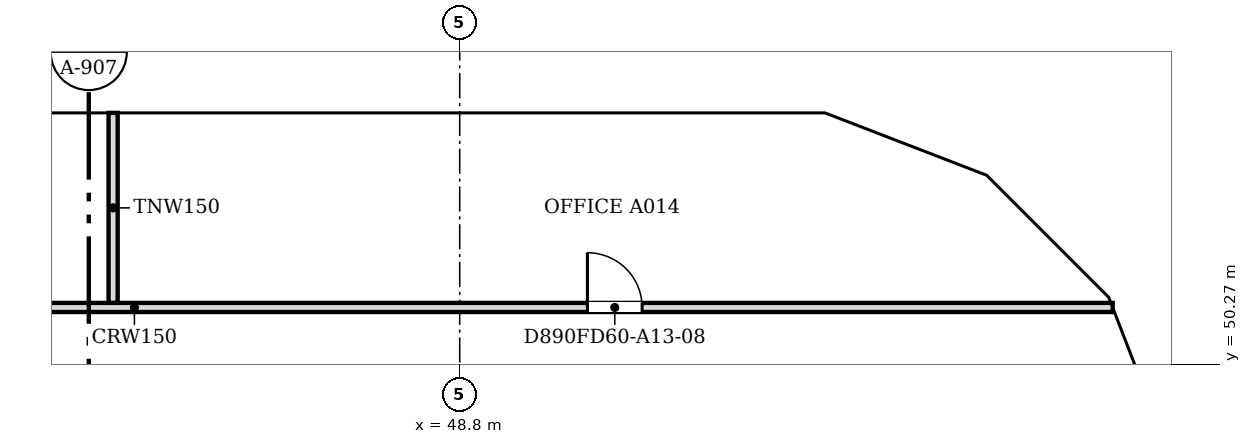
"""IFC4 building model, lengths in metres.
Left out: names, types, materials, properties, quantities, classifications, styles, units other than length and angle.
Written with IfcOpenShell. Run it as: python <this file> out.ifc"""

import sys

from ifc_helpers import new_model, si_unit, direction, frame, frame_2d, origin, place, context, subcontext, project, spatial, polyline, rectangle, outline, extrude, faceted_brep, source, transform, mapped, element, fill, save


model = new_model("IFC4")
c1 = context("Model", 3, precision=1e-05, world=origin(), true_north=direction((0.0, 1.0)))
c2 = subcontext(c1, "Body", "Model", "MODEL_VIEW")
j1 = project(units=[si_unit("LENGTHUNIT", "METRE"), si_unit("PLANEANGLEUNIT", "RADIAN")], contexts=[c1])
p1 = place(None, origin())
s1 = spatial("IfcSite", under=j1, at=p1, CompositionType="ELEMENT")
p2 = place(p1, origin())
s2 = spatial("IfcBuilding", under=s1, at=p2, CompositionType="ELEMENT")
p3 = place(p2, frame((0.0, 0.0, 146.8)))
s3 = spatial("IfcBuildingStorey", under=s2, at=p3, CompositionType="ELEMENT", Elevation=146.8)
m1 = source(origin(), c2, "Body", "Brep", [
    faceted_brep([(0.047, -0.25, 0.0), (2.997, -0.25, 3.8), (0.047, -0.25, 7.6), (0.0, -0.25, 7.541), (0.0, -0.25, 0.059), (0.093, 0.25, 7.54), (2.944, 0.25, 3.868), (2.944, 0.25, 3.732), (0.093, 0.25, 0.06), (2.997, 0.0, 3.8), (0.047, 0.0, 0.0), (0.047, 0.0, 7.6)], [[[0, 1, 2, 3, 4]], [[5, 6, 7, 8]], [[8, 7, 9, 1, 0, 10]], [[6, 5, 11, 2, 1, 9]], [[3, 2, 11]], [[10, 0, 4]], [[8, 10, 4, 3, 11, 5]], [[9, 7, 6]]]),
])
p4 = place(p3, frame((60.767, 48.71, -3.8), z_axis=(0.0, 0.0, 1.0), x_axis=(-0.359901446078, 0.932990326376, 0.0)))
e1 = element("IfcWall", 1, at=p4, inside=s3, PredefinedType="SOLIDWALL", context=c2, shape_type="MappedRepresentation", body=[
    mapped(m1, transform((0.0, 0.0, 0.0), scale=1.0)),
])
m2 = source(origin(), c2, "Body", "SweptSolid", [
    extrude(outline(polyline([(0.247, 0.665), (2.681, 3.8), (0.247, 6.935), (0.247, 0.665)])), frame((0.0, 0.26, 0.0), z_axis=(0.0, -1.0, 0.0), x_axis=(1.0, 0.0, 0.0)), (0.0, 0.0, 1.0), 0.52),
])
p5 = place(p4, origin())
e2 = element("IfcOpeningElement", 2, at=p5, cuts=e1, PredefinedType="OPENING", context=c2, shape_type="MappedRepresentation", body=[
    mapped(m2, transform((0.0, 0.0, 0.0), scale=1.0)),
])
m3 = source(origin(), c2, "Body", "Brep", [
    faceted_brep([(2.944, -0.25, 0.0), (2.997, -0.25, 0.068), (2.997, -0.25, 7.532), (2.944, -0.25, 7.6), (0.0, -0.25, 3.8), (0.053, 0.25, 3.868), (2.891, 0.25, 7.532), (2.891, 0.25, 0.068), (0.053, 0.25, 3.732), (2.944, 0.0, 0.0), (2.944, 0.0, 7.6), (0.0, 0.0, 3.8)], [[[0, 1, 2, 3, 4]], [[5, 6, 7, 8]], [[1, 0, 9]], [[10, 3, 2]], [[6, 5, 11, 4, 3, 10]], [[8, 7, 9, 0, 4, 11]], [[8, 11, 5]], [[1, 9, 7, 6, 10, 2]]]),
])
p6 = place(p3, frame((59.688, 51.506, -3.8), z_axis=(0.0, 0.0, 1.0), x_axis=(-0.707106781187, 0.707106781187, 0.0)))
e3 = element("IfcWall", 3, at=p6, inside=s3, PredefinedType="SOLIDWALL", context=c2, shape_type="MappedRepresentation", body=[
    mapped(m3, transform((0.0, 0.0, 0.0), scale=1.0)),
])
m4 = source(origin(), c2, "Body", "SweptSolid", [
    extrude(outline(polyline([(2.744, 6.934), (0.316, 3.8), (2.744, 0.666), (2.744, 6.934)])), frame((0.0, 0.26, 0.0), z_axis=(0.0, -1.0, 0.0), x_axis=(1.0, 0.0, 0.0)), (0.0, 0.0, 1.0), 0.52),
])
p7 = place(p6, origin())
e4 = element("IfcOpeningElement", 4, at=p7, cuts=e3, PredefinedType="OPENING", context=c2, shape_type="MappedRepresentation", body=[
    mapped(m4, transform((0.0, 0.0, 0.0), scale=1.0)),
])
m5 = source(origin(), c2, "Body", "Brep", [
    faceted_brep([(0.053, -0.25, 0.0), (3.003, -0.25, 3.8), (0.053, -0.25, 7.6), (0.0, -0.25, 7.532), (0.0, -0.25, 0.068), (0.106, 0.25, 7.532), (2.957, 0.25, 3.86), (2.957, 0.25, 3.74), (0.106, 0.25, 0.068), (3.003, 0.0, 3.8), (0.053, 0.0, 0.0), (0.053, 0.0, 7.6)], [[[0, 1, 2, 3, 4]], [[5, 6, 7, 8]], [[8, 7, 9, 1, 0, 10]], [[6, 5, 11, 2, 1, 9]], [[3, 2, 11]], [[10, 0, 4]], [[8, 10, 4, 3, 11, 5]], [[9, 7, 6]]]),
])
p8 = place(p3, frame((57.656, 53.569, -3.8), z_axis=(0.0, 0.0, 1.0), x_axis=(-0.933007896601, 0.359855894603, 0.0)))
e5 = element("IfcWall", 5, at=p8, inside=s3, PredefinedType="SOLIDWALL", context=c2, shape_type="MappedRepresentation", body=[
    mapped(m5, transform((0.0, 0.0, 0.0), scale=1.0)),
])
m6 = source(origin(), c2, "Body", "SweptSolid", [
    extrude(outline(polyline([(0.253, 0.665), (2.687, 3.8), (0.253, 6.935), (0.253, 0.665)])), frame((0.0, 0.26, 0.0), z_axis=(0.0, -1.0, 0.0), x_axis=(1.0, 0.0, 0.0)), (0.0, 0.0, 1.0), 0.52),
])
p9 = place(p8, origin())
e6 = element("IfcOpeningElement", 6, at=p9, cuts=e5, PredefinedType="OPENING", context=c2, shape_type="MappedRepresentation", body=[
    mapped(m6, transform((0.0, 0.0, 0.0), scale=1.0)),
])
m7 = source(origin(), c2, "Body", "Brep", [
    faceted_brep([(3.003, -0.25, 0.0), (6.053, -0.25, 3.8), (3.003, -0.25, 7.6), (0.0, -0.25, 3.8), (0.047, 0.25, 3.859), (3.003, 0.25, 7.6), (6.053, 0.25, 3.8), (3.003, 0.25, 0.0), (0.047, 0.25, 3.741), (0.0, 0.0, 3.8)], [[[0, 1, 2, 3]], [[4, 5, 6, 7, 8]], [[7, 6, 1, 0]], [[6, 5, 2, 1]], [[5, 4, 9, 3, 2]], [[8, 7, 0, 3, 9]], [[8, 9, 4]]]),
])
p10 = place(p3, frame((54.854, 54.65, -3.8), z_axis=(0.0, 0.0, 1.0), x_axis=(-1.0, 0.0, 0.0)))
e7 = element("IfcWall", 7, at=p10, inside=s3, PredefinedType="SOLIDWALL", context=c2, shape_type="MappedRepresentation", body=[
    mapped(m7, transform((0.0, 0.0, 0.0), scale=1.0)),
])
m8 = source(origin(), c2, "Body", "SweptSolid", [
    extrude(outline(polyline([(3.005, 0.401), (5.733, 3.8), (3.005, 7.199), (0.319, 3.8), (3.005, 0.401)])), frame((0.0, 0.26, 0.0), z_axis=(0.0, -1.0, 0.0), x_axis=(1.0, 0.0, 0.0)), (0.0, 0.0, 1.0), 0.52),
])
p11 = place(p10, origin())
e8 = element("IfcOpeningElement", 8, at=p11, cuts=e7, PredefinedType="OPENING", context=c2, shape_type="MappedRepresentation", body=[
    mapped(m8, transform((0.0, 0.0, 0.0), scale=1.0)),
])
m9 = source(origin(), c2, "Body", "SweptSolid", [
    extrude(outline(polyline([(3.05, 0.0), (6.1, 3.8), (3.05, 7.6), (0.0, 3.8), (3.05, 0.0)])), frame((0.0, 0.25, 0.0), z_axis=(0.0, -1.0, 0.0), x_axis=(1.0, 0.0, 0.0)), (0.0, 0.0, 1.0), 0.5),
])
p12 = place(p3, frame((48.8, 54.65, -3.8), z_axis=(0.0, 0.0, 1.0), x_axis=(-1.0, 0.0, 0.0)))
e9 = element("IfcWall", 9, at=p12, inside=s3, PredefinedType="SOLIDWALL", context=c2, shape_type="MappedRepresentation", body=[
    mapped(m9, transform((0.0, 0.0, 0.0), scale=1.0)),
])
m10 = source(origin(), c2, "Body", "SweptSolid", [
    extrude(outline(polyline([(3.05, 0.399), (5.78, 3.8), (3.05, 7.201), (0.321, 3.8), (3.05, 0.399)])), frame((0.0, 0.26, 0.0), z_axis=(0.0, -1.0, 0.0), x_axis=(1.0, 0.0, 0.0)), (0.0, 0.0, 1.0), 0.52),
])
p13 = place(p12, origin())
e10 = element("IfcOpeningElement", 10, at=p13, cuts=e9, PredefinedType="OPENING", context=c2, shape_type="MappedRepresentation", body=[
    mapped(m10, transform((0.0, 0.0, 0.0), scale=1.0)),
])
m11 = source(origin(), c2, "Body", "Brep", [
    faceted_brep([(3.05, -0.25, 0.0), (6.1, -0.25, 3.8), (6.1, -0.25, 3.8), (3.05, -0.25, 7.6), (0.0, -0.25, 3.8), (0.0, 0.25, 3.8), (3.05, 0.25, 7.6), (6.1, 0.25, 3.8), (6.1, 0.25, 3.8), (3.05, 0.25, 0.0)], [[[0, 1, 2, 3, 4]], [[5, 6, 7, 8, 9]], [[9, 8, 1, 0]], [[7, 6, 3, 2]], [[6, 5, 4, 3]], [[5, 9, 0, 4]], [[1, 8, 7, 2]]]),
])
p14 = place(p3, frame((42.7, 54.65, -3.8), z_axis=(0.0, 0.0, 1.0), x_axis=(-1.0, 0.0, 0.0)))
e11 = element("IfcWall", 11, at=p14, inside=s3, PredefinedType="SOLIDWALL", context=c2, shape_type="MappedRepresentation", body=[
    mapped(m11, transform((0.0, 0.0, 0.0), scale=1.0)),
])
p15 = place(p14, origin())
e12 = element("IfcOpeningElement", 12, at=p15, cuts=e11, PredefinedType="OPENING", context=c2, shape_type="MappedRepresentation", body=[
    mapped(m10, transform((0.0, 0.0, 0.0), scale=1.0)),
])
m12 = source(origin(), c2, "Body", "Brep", [
    faceted_brep([(2.95, -0.25, 0.0), (3.003, -0.25, 0.068), (3.003, -0.25, 3.8), (0.0, -0.25, 3.8), (0.047, 0.25, 3.8), (2.898, 0.25, 3.8), (2.898, 0.25, 0.068), (0.047, 0.25, 3.74), (2.95, 0.0, 0.0), (0.0, 0.0, 3.8)], [[[0, 1, 2, 3]], [[4, 5, 6, 7]], [[1, 0, 8]], [[5, 4, 9, 3, 2]], [[7, 6, 8, 0, 3, 9]], [[7, 9, 4]], [[1, 8, 6, 5, 2]]]),
])
p16 = place(p3, frame((60.75, 48.753, 0.0), z_axis=(0.0, 0.0, 1.0), x_axis=(-0.35992665181, 0.932980602862, 0.0)))
e13 = element("IfcWall", 13, at=p16, inside=s3, PredefinedType="SOLIDWALL", context=c2, shape_type="MappedRepresentation", body=[
    mapped(m12, transform((0.0, 0.0, 0.0), scale=1.0)),
])
m13 = source(origin(), c2, "Body", "SweptSolid", [
    extrude(outline(polyline([(2.75, 3.55), (0.511, 3.55), (2.75, 0.665), (2.75, 3.55)])), frame((0.0, 0.26, 0.0), z_axis=(0.0, -1.0, 0.0), x_axis=(1.0, 0.0, 0.0)), (0.0, 0.0, 1.0), 0.52),
])
p17 = place(p16, origin())
e14 = element("IfcOpeningElement", 14, at=p17, cuts=e13, PredefinedType="OPENING", context=c2, shape_type="MappedRepresentation", body=[
    mapped(m13, transform((0.0, 0.0, 0.0), scale=1.0)),
])
m14 = source(origin(), c2, "Body", "Brep", [
    faceted_brep([(0.053, -0.25, 0.0), (2.997, -0.25, 3.8), (0.0, -0.25, 3.8), (0.0, -0.25, 0.068), (0.106, 0.25, 3.8), (2.944, 0.25, 3.8), (2.944, 0.25, 3.732), (0.106, 0.25, 0.068), (2.997, 0.0, 3.8), (0.053, 0.0, 0.0)], [[[0, 1, 2, 3]], [[4, 5, 6, 7]], [[7, 6, 8, 1, 0, 9]], [[5, 4, 2, 1, 8]], [[9, 0, 3]], [[7, 9, 3, 2, 4]], [[6, 5, 8]]]),
])
p18 = place(p3, frame((59.726, 51.469, 0.0), z_axis=(0.0, 0.0, 1.0), x_axis=(-0.707106781187, 0.707106781187, 0.0)))
e15 = element("IfcWall", 15, at=p18, inside=s3, PredefinedType="SOLIDWALL", context=c2, shape_type="MappedRepresentation", body=[
    mapped(m14, transform((0.0, 0.0, 0.0), scale=1.0)),
])
m15 = source(origin(), c2, "Body", "SweptSolid", [
    extrude(outline(polyline([(0.253, 0.666), (2.487, 3.55), (0.253, 3.55), (0.253, 0.666)])), frame((0.0, 0.26, 0.0), z_axis=(0.0, -1.0, 0.0), x_axis=(1.0, 0.0, 0.0)), (0.0, 0.0, 1.0), 0.52),
])
p19 = place(p18, origin())
e16 = element("IfcOpeningElement", 16, at=p19, cuts=e15, PredefinedType="OPENING", context=c2, shape_type="MappedRepresentation", body=[
    mapped(m15, transform((0.0, 0.0, 0.0), scale=1.0)),
])
m16 = source(origin(), c2, "Body", "Brep", [
    faceted_brep([(2.95, -0.25, 0.0), (2.997, -0.25, 0.059), (2.997, -0.25, 3.8), (0.0, -0.25, 3.8), (0.053, 0.25, 3.8), (2.904, 0.25, 3.8), (2.904, 0.25, 0.06), (0.053, 0.25, 3.732), (2.95, 0.0, 0.0), (0.0, 0.0, 3.8)], [[[0, 1, 2, 3]], [[4, 5, 6, 7]], [[1, 0, 8]], [[5, 4, 9, 3, 2]], [[7, 6, 8, 0, 3, 9]], [[7, 9, 4]], [[1, 8, 6, 5, 2]]]),
])
p20 = place(p3, frame((57.606, 53.588, 0.0), z_axis=(0.0, 0.0, 1.0), x_axis=(-0.932990326376, 0.359901446078, 0.0)))
e17 = element("IfcWall", 17, at=p20, inside=s3, PredefinedType="SOLIDWALL", context=c2, shape_type="MappedRepresentation", body=[
    mapped(m16, transform((0.0, 0.0, 0.0), scale=1.0)),
])
p21 = place(p20, origin())
e18 = element("IfcOpeningElement", 18, at=p21, cuts=e17, PredefinedType="OPENING", context=c2, shape_type="MappedRepresentation", body=[
    mapped(m13, transform((0.0, 0.0, 0.0), scale=1.0)),
])
m17 = source(origin(), c2, "Body", "Brep", [
    faceted_brep([(0.047, -0.25, 0.0), (3.05, -0.25, 3.8), (0.0, -0.25, 3.8), (0.0, -0.25, 0.06), (0.093, 0.25, 3.8), (3.05, 0.25, 3.8), (0.093, 0.25, 0.059), (0.047, 0.0, 0.0)], [[[0, 1, 2, 3]], [[4, 5, 6]], [[6, 5, 1, 0, 7]], [[5, 4, 2, 1]], [[7, 0, 3]], [[6, 7, 3, 2, 4]]]),
])
p22 = place(p3, frame((54.9, 54.65, 0.0), z_axis=(0.0, 0.0, 1.0), x_axis=(-1.0, 0.0, 0.0)))
e19 = element("IfcWall", 19, at=p22, inside=s3, PredefinedType="SOLIDWALL", context=c2, shape_type="MappedRepresentation", body=[
    mapped(m17, transform((0.0, 0.0, 0.0), scale=1.0)),
])
m18 = source(origin(), c2, "Body", "SweptSolid", [
    extrude(outline(polyline([(0.247, 0.656), (2.534, 3.55), (0.247, 3.55), (0.247, 0.656)])), frame((0.0, 0.26, 0.0), z_axis=(0.0, -1.0, 0.0), x_axis=(1.0, 0.0, 0.0)), (0.0, 0.0, 1.0), 0.52),
])
p23 = place(p22, origin())
e20 = element("IfcOpeningElement", 20, at=p23, cuts=e19, PredefinedType="OPENING", context=c2, shape_type="MappedRepresentation", body=[
    mapped(m18, transform((0.0, 0.0, 0.0), scale=1.0)),
])
m19 = source(origin(), c2, "Body", "SweptSolid", [
    extrude(outline(polyline([(3.05, 0.0), (6.1, 3.8), (0.0, 3.8), (3.05, 0.0)])), frame((0.0, 0.25, 0.0), z_axis=(0.0, -1.0, 0.0), x_axis=(1.0, 0.0, 0.0)), (0.0, 0.0, 1.0), 0.5),
])
p24 = place(p3, frame((51.85, 54.65, 0.0), z_axis=(0.0, 0.0, 1.0), x_axis=(-1.0, 0.0, 0.0)))
e21 = element("IfcWall", 21, at=p24, inside=s3, PredefinedType="SOLIDWALL", context=c2, shape_type="MappedRepresentation", body=[
    mapped(m19, transform((0.0, 0.0, 0.0), scale=1.0)),
])
m20 = source(origin(), c2, "Body", "SweptSolid", [
    extrude(outline(polyline([(3.05, 0.399), (5.579, 3.55), (0.521, 3.55), (3.05, 0.399)])), frame((0.0, 0.26, 0.0), z_axis=(0.0, -1.0, 0.0), x_axis=(1.0, 0.0, 0.0)), (0.0, 0.0, 1.0), 0.52),
])
p25 = place(p24, origin())
e22 = element("IfcOpeningElement", 22, at=p25, cuts=e21, PredefinedType="OPENING", context=c2, shape_type="MappedRepresentation", body=[
    mapped(m20, transform((0.0, 0.0, 0.0), scale=1.0)),
])
p26 = place(p3, frame((45.75, 54.65, 0.0), z_axis=(0.0, 0.0, 1.0), x_axis=(-1.0, 0.0, 0.0)))
e23 = element("IfcWall", 23, at=p26, inside=s3, PredefinedType="SOLIDWALL", context=c2, shape_type="MappedRepresentation", body=[
    mapped(m19, transform((0.0, 0.0, 0.0), scale=1.0)),
])
p27 = place(p26, origin())
e24 = element("IfcOpeningElement", 24, at=p27, cuts=e23, PredefinedType="OPENING", context=c2, shape_type="MappedRepresentation", body=[
    mapped(m20, transform((0.0, 0.0, 0.0), scale=1.0)),
])
p28 = place(p3, frame((28.1, 51.2, 0.0), z_axis=(0.0, 0.0, 1.0), x_axis=(1.0, 0.0, 0.0)))
e25 = element("IfcWall", 25, at=p28, inside=s3, PredefinedType="PARTITIONING", context=c2, shape_type="SweptSolid", body=[
    extrude(rectangle(XDim=31.438, YDim=0.15, at=frame_2d((15.719, 0.0))), origin(), (0.0, 0.0, 1.0), 2.888),
])
m21 = source(origin(), c2, "Body", "SweptSolid", [
    extrude(rectangle(XDim=0.9, YDim=2.1, at=frame_2d((0.45, 1.05))), frame((0.0, 0.085, 0.0), z_axis=(0.0, -1.0, 0.0), x_axis=(1.0, 0.0, 0.0)), (0.0, 0.0, 1.0), 0.17),
])
p29 = place(p28, frame((7.0, 0.0, 0.0)))
e26 = element("IfcOpeningElement", 26, at=p29, cuts=e25, PredefinedType="OPENING", context=c2, shape_type="MappedRepresentation", body=[
    mapped(m21, transform((0.0, 0.0, 0.0), scale=1.0)),
])
p30 = place(p28, frame((22.8, 0.0, 0.0)))
e27 = element("IfcOpeningElement", 27, at=p30, cuts=e25, PredefinedType="OPENING", context=c2, shape_type="MappedRepresentation", body=[
    mapped(m21, transform((0.0, 0.0, 0.0), scale=1.0)),
])
p31 = place(p3, frame((43.1, 51.276, 0.0), z_axis=(0.0, 0.0, 1.0), x_axis=(0.0, 1.0, 0.0)))
e28 = element("IfcWall", 28, at=p31, inside=s3, PredefinedType="PARTITIONING", context=c2, shape_type="SweptSolid", body=[
    extrude(rectangle(XDim=3.124, YDim=0.15, at=frame_2d((1.562, 0.0))), origin(), (0.0, 0.0, 1.0), 2.888),
])
m22 = source(origin(), c2, "Body", "SweptSolid", [
    extrude(rectangle(XDim=0.9, YDim=2.1, at=frame_2d((0.45, 1.05))), frame((0.0, 0.025, 0.0), z_axis=(0.0, -1.0, 0.0), x_axis=(1.0, 0.0, 0.0)), (0.0, 0.0, 1.0), 0.05),
])
p32 = place(p30, origin())
e29 = element("IfcDoor", 29, at=p32, inside=s3, OperationType="SINGLE_SWING_LEFT", PredefinedType="DOOR", context=c2, shape_type="MappedRepresentation", body=[
    mapped(m22, transform((0.0, 0.0, 0.0), scale=1.0)),
])
fill(e27, e29)
save(model, sys.argv[1])
